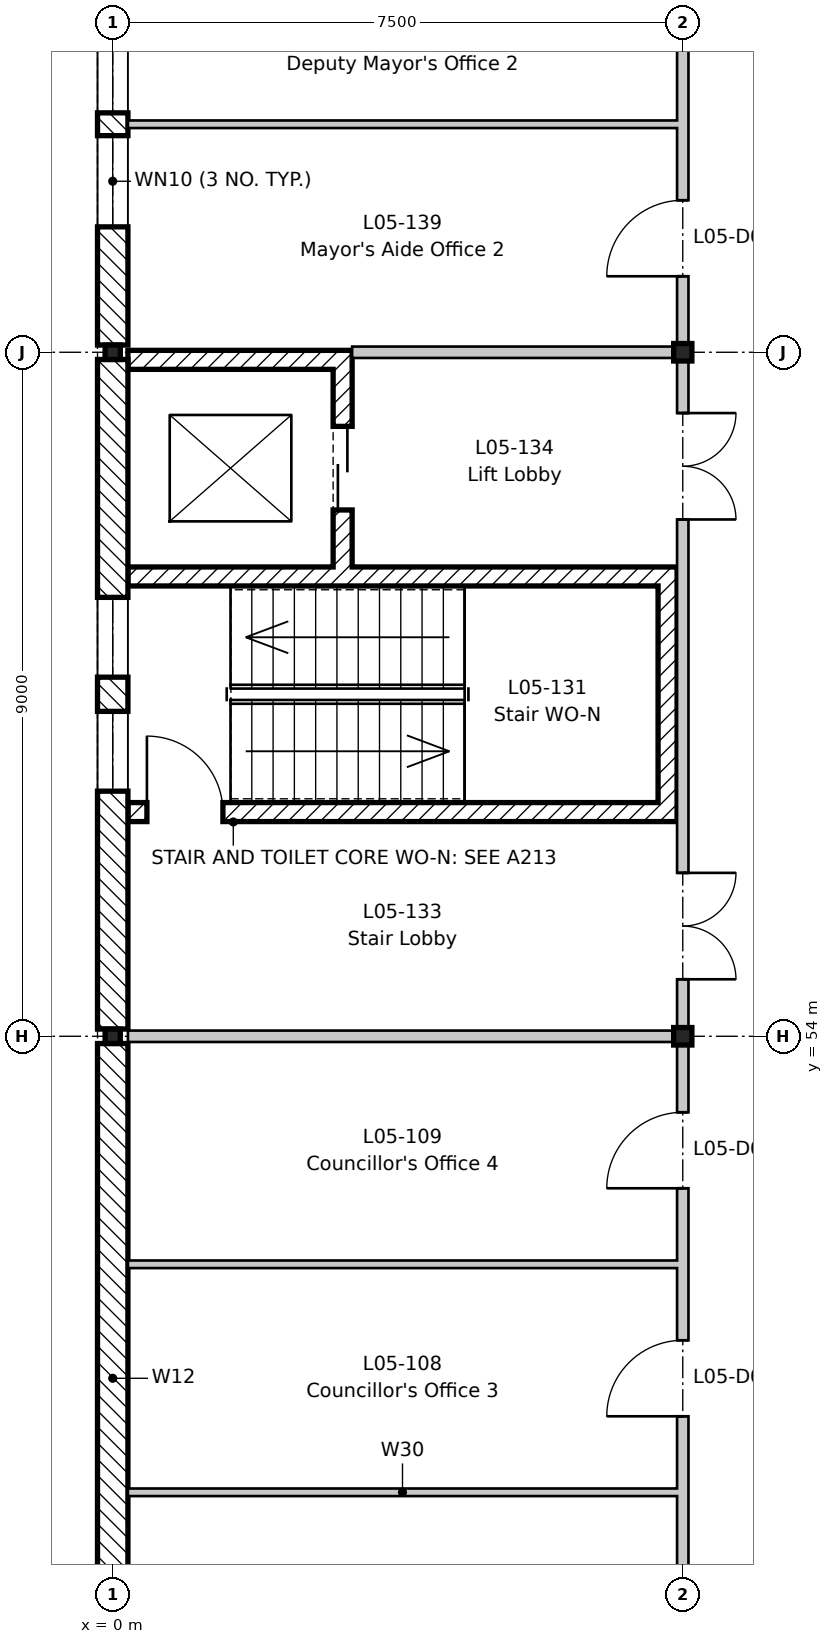
"""IFC4 building model, lengths in metres.
Left out: names, types, materials, properties, quantities, classifications, styles, units other than length and angle.
Written with IfcOpenShell. Run it as: python <this file> out.ifc"""

import sys

from ifc_helpers import new_model, si_unit, direction, frame, frame_2d, origin, origin_2d, place, context, subcontext, project, spatial, rectangle, i_section, extrude, element, fill, save


model = new_model("IFC4")
c1 = context("Model", 3, precision=1e-05, world=origin(), true_north=direction((0.0, 1.0)))
c2 = subcontext(c1, "Body", "Model", "MODEL_VIEW")
j1 = project(units=[si_unit("LENGTHUNIT", "METRE"), si_unit("PLANEANGLEUNIT", "RADIAN")], contexts=[c1])
p1 = place(None, origin())
s1 = spatial("IfcSite", under=j1, at=p1, CompositionType="ELEMENT")
p2 = place(p1, origin())
s2 = spatial("IfcBuilding", under=s1, at=p2, CompositionType="ELEMENT")
p3 = place(p2, frame((0.0, 0.0, 22.8)))
s3 = spatial("IfcBuildingStorey", under=s2, at=p3, CompositionType="ELEMENT", Elevation=22.8)
for number, where, z_axis, x_axis in (
    (1, (0.0, 54.0, -0.2), (0.0, 0.0, 1.0), (1.0, 0.0, 0.0)),
    (2, (0.0, 63.0, -0.2), (0.0, 0.0, 1.0), (1.0, 0.0, 0.0)),
):
    element("IfcColumn", number, at=place(p3, frame(where, z_axis=z_axis, x_axis=x_axis)), inside=s3, PredefinedType="COLUMN", context=c2, shape_type="SweptSolid", body=[
        extrude(i_section(OverallWidth=0.2, OverallDepth=0.19, WebThickness=0.007, FlangeThickness=0.01, FilletRadius=0.018, at=origin_2d()), origin(), (0.0, 0.0, 1.0), 4.15),
    ])
for number, where, z_axis, x_axis in (
    (3, (7.5, 54.0, -0.2), (0.0, 0.0, 1.0), (1.0, 0.0, 0.0)),
    (4, (7.5, 63.0, -0.2), (0.0, 0.0, 1.0), (1.0, 0.0, 0.0)),
):
    element("IfcColumn", number, at=place(p3, frame(where, z_axis=z_axis, x_axis=x_axis)), inside=s3, PredefinedType="COLUMN", context=c2, shape_type="SweptSolid", body=[
        extrude(i_section(OverallWidth=0.24, OverallDepth=0.23, WebThickness=0.008, FlangeThickness=0.012, FilletRadius=0.021, at=origin_2d()), origin(), (0.0, 0.0, 1.0), 4.15),
    ])
p4 = place(p3, frame((0.2, 56.95, 0.0), z_axis=(0.0, 0.0, 1.0), x_axis=(1.0, 0.0, 0.0)))
e5 = element("IfcWall", 5, at=p4, inside=s3, PredefinedType="SHEAR", context=c2, shape_type="SweptSolid", body=[
    extrude(rectangle(XDim=7.225, YDim=0.25, at=frame_2d((3.613, 0.0))), origin(), (0.0, 0.0, 1.0), 3.95),
])
p5 = place(p4, frame((0.25, 0.0, 0.0)))
e6 = element("IfcOpeningElement", 6, at=p5, cuts=e5, PredefinedType="OPENING", context=c2, shape_type="SweptSolid", body=[
    extrude(rectangle(XDim=1.0, YDim=2.1, at=frame_2d((0.5, 1.05))), frame((0.0, 0.135, 0.0), z_axis=(0.0, -1.0, 0.0), x_axis=(1.0, 0.0, 0.0)), (0.0, 0.0, 1.0), 0.27),
])
p6 = place(p3, frame((0.2, 60.05, 0.0), z_axis=(0.0, 0.0, 1.0), x_axis=(1.0, 0.0, 0.0)))
e7 = element("IfcWall", 7, at=p6, inside=s3, PredefinedType="SHEAR", context=c2, shape_type="SweptSolid", body=[
    extrude(rectangle(XDim=7.225, YDim=0.25, at=frame_2d((3.613, 0.0))), origin(), (0.0, 0.0, 1.0), 3.95),
])
p7 = place(p3, frame((7.3, 57.075, 0.0), z_axis=(0.0, 0.0, 1.0), x_axis=(0.0, 1.0, 0.0)))
e8 = element("IfcWall", 8, at=p7, inside=s3, PredefinedType="SHEAR", context=c2, shape_type="SweptSolid", body=[
    extrude(rectangle(XDim=2.85, YDim=0.25, at=frame_2d((1.425, 0.0))), origin(), (0.0, 0.0, 1.0), 3.95),
])
p8 = place(p3, frame((3.025, 60.175, 0.0), z_axis=(0.0, 0.0, 1.0), x_axis=(0.0, 1.0, 0.0)))
e9 = element("IfcWall", 9, at=p8, inside=s3, PredefinedType="SHEAR", context=c2, shape_type="SweptSolid", body=[
    extrude(rectangle(XDim=2.6, YDim=0.25, at=frame_2d((1.3, 0.0))), origin(), (0.0, 0.0, 1.0), 3.95),
])
p9 = place(p8, frame((0.75, 0.0, 0.0)))
e10 = element("IfcOpeningElement", 10, at=p9, cuts=e9, PredefinedType="OPENING", context=c2, shape_type="SweptSolid", body=[
    extrude(rectangle(XDim=1.1, YDim=2.1, at=frame_2d((0.55, 1.05))), frame((0.0, 0.135, 0.0), z_axis=(0.0, -1.0, 0.0), x_axis=(1.0, 0.0, 0.0)), (0.0, 0.0, 1.0), 0.27),
])
p10 = place(p3, frame((0.2, 62.9, 0.0), z_axis=(0.0, 0.0, 1.0), x_axis=(1.0, 0.0, 0.0)))
e11 = element("IfcWall", 11, at=p10, inside=s3, PredefinedType="SHEAR", context=c2, shape_type="SweptSolid", body=[
    extrude(rectangle(XDim=2.95, YDim=0.25, at=frame_2d((1.475, 0.0))), origin(), (0.0, 0.0, 1.0), 3.95),
])
p11 = place(p3, frame((0.0, 45.095, 0.0), z_axis=(0.0, 0.0, 1.0), x_axis=(0.0, 1.0, 0.0)))
e12 = element("IfcWall", 12, at=p11, inside=s3, PredefinedType="STANDARD", context=c2, shape_type="SweptSolid", body=[
    extrude(rectangle(XDim=8.81, YDim=0.4, at=frame_2d((4.405, 0.0))), origin(), (0.0, 0.0, 1.0), 3.55),
])
p12 = place(p3, frame((0.0, 54.095, 0.0), z_axis=(0.0, 0.0, 1.0), x_axis=(0.0, 1.0, 0.0)))
e13 = element("IfcWall", 13, at=p12, inside=s3, PredefinedType="STANDARD", context=c2, shape_type="SweptSolid", body=[
    extrude(rectangle(XDim=8.81, YDim=0.4, at=frame_2d((4.405, 0.0))), origin(), (0.0, 0.0, 1.0), 3.55),
])
p13 = place(p12, frame((3.13, 0.0, 0.9)))
e14 = element("IfcOpeningElement", 14, at=p13, cuts=e13, PredefinedType="OPENING", context=c2, shape_type="SweptSolid", body=[
    extrude(rectangle(XDim=1.05, YDim=2.6, at=frame_2d((0.525, 1.3))), frame((0.0, 0.21, 0.0), z_axis=(0.0, -1.0, 0.0), x_axis=(1.0, 0.0, 0.0)), (0.0, 0.0, 1.0), 0.42),
])
p14 = place(p12, frame((4.63, 0.0, 0.9)))
e15 = element("IfcOpeningElement", 15, at=p14, cuts=e13, PredefinedType="OPENING", context=c2, shape_type="SweptSolid", body=[
    extrude(rectangle(XDim=1.05, YDim=2.6, at=frame_2d((0.525, 1.3))), frame((0.0, 0.21, 0.0), z_axis=(0.0, -1.0, 0.0), x_axis=(1.0, 0.0, 0.0)), (0.0, 0.0, 1.0), 0.42),
])
p15 = place(p3, frame((0.0, 63.095, 0.0), z_axis=(0.0, 0.0, 1.0), x_axis=(0.0, 1.0, 0.0)))
e16 = element("IfcWall", 16, at=p15, inside=s3, PredefinedType="STANDARD", context=c2, shape_type="SweptSolid", body=[
    extrude(rectangle(XDim=7.31, YDim=0.4, at=frame_2d((3.655, 0.0))), origin(), (0.0, 0.0, 1.0), 3.55),
])
p16 = place(p15, frame((1.555, 0.0, 0.6)))
e17 = element("IfcOpeningElement", 17, at=p16, cuts=e16, PredefinedType="OPENING", context=c2, shape_type="SweptSolid", body=[
    extrude(rectangle(XDim=1.2, YDim=1.8, at=frame_2d((0.6, 0.9))), frame((0.0, 0.21, 0.0), z_axis=(0.0, -1.0, 0.0), x_axis=(1.0, 0.0, 0.0)), (0.0, 0.0, 1.0), 0.42),
])
p17 = place(p15, frame((3.055, 0.0, 0.6)))
e18 = element("IfcOpeningElement", 18, at=p17, cuts=e16, PredefinedType="OPENING", context=c2, shape_type="SweptSolid", body=[
    extrude(rectangle(XDim=1.2, YDim=1.8, at=frame_2d((0.6, 0.9))), frame((0.0, 0.21, 0.0), z_axis=(0.0, -1.0, 0.0), x_axis=(1.0, 0.0, 0.0)), (0.0, 0.0, 1.0), 0.42),
])
p18 = place(p15, frame((4.555, 0.0, 0.6)))
e19 = element("IfcOpeningElement", 19, at=p18, cuts=e16, PredefinedType="OPENING", context=c2, shape_type="SweptSolid", body=[
    extrude(rectangle(XDim=1.2, YDim=1.8, at=frame_2d((0.6, 0.9))), frame((0.0, 0.21, 0.0), z_axis=(0.0, -1.0, 0.0), x_axis=(1.0, 0.0, 0.0)), (0.0, 0.0, 1.0), 0.42),
])
for number, where, z_axis, x_axis in (
    (20, (0.2, 48.0, 0.0), (0.0, 0.0, 1.0), (1.0, 0.0, 0.0)),
    (21, (0.2, 51.0, 0.0), (0.0, 0.0, 1.0), (1.0, 0.0, 0.0)),
):
    element("IfcWall", number, at=place(p3, frame(where, z_axis=z_axis, x_axis=x_axis)), inside=s3, PredefinedType="PARTITIONING", context=c2, shape_type="SweptSolid", body=[
        extrude(rectangle(XDim=7.225, YDim=0.1, at=frame_2d((3.613, 0.0))), origin(), (0.0, 0.0, 1.0), 3.95),
    ])
p19 = place(p3, frame((0.2, 54.0, 0.0), z_axis=(0.0, 0.0, 1.0), x_axis=(1.0, 0.0, 0.0)))
e22 = element("IfcWall", 22, at=p19, inside=s3, PredefinedType="PARTITIONING", context=c2, shape_type="SweptSolid", body=[
    extrude(rectangle(XDim=7.225, YDim=0.15, at=frame_2d((3.613, 0.0))), origin(), (0.0, 0.0, 1.0), 3.6),
])
p20 = place(p3, frame((7.5, -8.8, 0.0), z_axis=(0.0, 0.0, 1.0), x_axis=(0.0, 1.0, 0.0)))
e23 = element("IfcWall", 23, at=p20, inside=s3, PredefinedType="PARTITIONING", context=c2, shape_type="SweptSolid", body=[
    extrude(rectangle(XDim=79.3, YDim=0.15, at=frame_2d((39.65, 0.0))), origin(), (0.0, 0.0, 1.0), 3.43),
])
p21 = place(p20, frame((18.8, 0.0, 0.0)))
e24 = element("IfcOpeningElement", 24, at=p21, cuts=e23, PredefinedType="OPENING", context=c2, shape_type="SweptSolid", body=[
    extrude(rectangle(XDim=1.0, YDim=2.1, at=frame_2d((0.5, 1.05))), frame((0.0, 0.085, 0.0), z_axis=(0.0, -1.0, 0.0), x_axis=(1.0, 0.0, 0.0)), (0.0, 0.0, 1.0), 0.17),
])
p22 = place(p20, frame((23.3, 0.0, 0.0)))
e25 = element("IfcOpeningElement", 25, at=p22, cuts=e23, PredefinedType="OPENING", context=c2, shape_type="SweptSolid", body=[
    extrude(rectangle(XDim=1.0, YDim=2.1, at=frame_2d((0.5, 1.05))), frame((0.0, 0.085, 0.0), z_axis=(0.0, -1.0, 0.0), x_axis=(1.0, 0.0, 0.0)), (0.0, 0.0, 1.0), 0.17),
])
p23 = place(p20, frame((27.8, 0.0, 0.0)))
e26 = element("IfcOpeningElement", 26, at=p23, cuts=e23, PredefinedType="OPENING", context=c2, shape_type="SweptSolid", body=[
    extrude(rectangle(XDim=1.0, YDim=2.1, at=frame_2d((0.5, 1.05))), frame((0.0, 0.085, 0.0), z_axis=(0.0, -1.0, 0.0), x_axis=(1.0, 0.0, 0.0)), (0.0, 0.0, 1.0), 0.17),
])
p24 = place(p20, frame((32.3, 0.0, 0.0)))
e27 = element("IfcOpeningElement", 27, at=p24, cuts=e23, PredefinedType="OPENING", context=c2, shape_type="SweptSolid", body=[
    extrude(rectangle(XDim=1.0, YDim=2.1, at=frame_2d((0.5, 1.05))), frame((0.0, 0.085, 0.0), z_axis=(0.0, -1.0, 0.0), x_axis=(1.0, 0.0, 0.0)), (0.0, 0.0, 1.0), 0.17),
])
p25 = place(p20, frame((45.8, 0.0, 0.0)))
e28 = element("IfcOpeningElement", 28, at=p25, cuts=e23, PredefinedType="OPENING", context=c2, shape_type="SweptSolid", body=[
    extrude(rectangle(XDim=1.0, YDim=2.1, at=frame_2d((0.5, 1.05))), frame((0.0, 0.085, 0.0), z_axis=(0.0, -1.0, 0.0), x_axis=(1.0, 0.0, 0.0)), (0.0, 0.0, 1.0), 0.17),
])
p26 = place(p20, frame((48.8, 0.0, 0.0)))
e29 = element("IfcOpeningElement", 29, at=p26, cuts=e23, PredefinedType="OPENING", context=c2, shape_type="SweptSolid", body=[
    extrude(rectangle(XDim=1.0, YDim=2.1, at=frame_2d((0.5, 1.05))), frame((0.0, 0.085, 0.0), z_axis=(0.0, -1.0, 0.0), x_axis=(1.0, 0.0, 0.0)), (0.0, 0.0, 1.0), 0.17),
])
p27 = place(p20, frame((54.55, 0.0, 0.0)))
e30 = element("IfcOpeningElement", 30, at=p27, cuts=e23, PredefinedType="OPENING", context=c2, shape_type="SweptSolid", body=[
    extrude(rectangle(XDim=1.0, YDim=2.1, at=frame_2d((0.5, 1.05))), frame((0.0, 0.085, 0.0), z_axis=(0.0, -1.0, 0.0), x_axis=(1.0, 0.0, 0.0)), (0.0, 0.0, 1.0), 0.17),
])
p28 = place(p20, frame((57.8, 0.0, 0.0)))
e31 = element("IfcOpeningElement", 31, at=p28, cuts=e23, PredefinedType="OPENING", context=c2, shape_type="SweptSolid", body=[
    extrude(rectangle(XDim=1.0, YDim=2.1, at=frame_2d((0.5, 1.05))), frame((0.0, 0.085, 0.0), z_axis=(0.0, -1.0, 0.0), x_axis=(1.0, 0.0, 0.0)), (0.0, 0.0, 1.0), 0.17),
])
p29 = place(p20, frame((60.8, 0.0, 0.0)))
e32 = element("IfcOpeningElement", 32, at=p29, cuts=e23, PredefinedType="OPENING", context=c2, shape_type="SweptSolid", body=[
    extrude(rectangle(XDim=1.0, YDim=2.1, at=frame_2d((0.5, 1.05))), frame((0.0, 0.085, 0.0), z_axis=(0.0, -1.0, 0.0), x_axis=(1.0, 0.0, 0.0)), (0.0, 0.0, 1.0), 0.17),
])
p30 = place(p20, frame((12.6, 0.0, 0.0)))
e33 = element("IfcOpeningElement", 33, at=p30, cuts=e23, PredefinedType="OPENING", context=c2, shape_type="SweptSolid", body=[
    extrude(rectangle(XDim=1.4, YDim=2.1, at=frame_2d((0.7, 1.05))), frame((0.0, 0.085, 0.0), z_axis=(0.0, -1.0, 0.0), x_axis=(1.0, 0.0, 0.0)), (0.0, 0.0, 1.0), 0.17),
])
p31 = place(p20, frame((3.6, 0.0, 0.0)))
e34 = element("IfcOpeningElement", 34, at=p31, cuts=e23, PredefinedType="OPENING", context=c2, shape_type="SweptSolid", body=[
    extrude(rectangle(XDim=1.4, YDim=2.1, at=frame_2d((0.7, 1.05))), frame((0.0, 0.085, 0.0), z_axis=(0.0, -1.0, 0.0), x_axis=(1.0, 0.0, 0.0)), (0.0, 0.0, 1.0), 0.17),
])
p32 = place(p20, frame((63.55, 0.0, 0.0)))
e35 = element("IfcOpeningElement", 35, at=p32, cuts=e23, PredefinedType="OPENING", context=c2, shape_type="SweptSolid", body=[
    extrude(rectangle(XDim=1.4, YDim=2.1, at=frame_2d((0.7, 1.05))), frame((0.0, 0.085, 0.0), z_axis=(0.0, -1.0, 0.0), x_axis=(1.0, 0.0, 0.0)), (0.0, 0.0, 1.0), 0.17),
])
p33 = place(p20, frame((69.6, 0.0, 0.0)))
e36 = element("IfcOpeningElement", 36, at=p33, cuts=e23, PredefinedType="OPENING", context=c2, shape_type="SweptSolid", body=[
    extrude(rectangle(XDim=1.4, YDim=2.1, at=frame_2d((0.7, 1.05))), frame((0.0, 0.085, 0.0), z_axis=(0.0, -1.0, 0.0), x_axis=(1.0, 0.0, 0.0)), (0.0, 0.0, 1.0), 0.17),
])
p34 = place(p20, frame((42.85, 0.0, 0.0)))
e37 = element("IfcOpeningElement", 37, at=p34, cuts=e23, PredefinedType="OPENING", context=c2, shape_type="SweptSolid", body=[
    extrude(rectangle(XDim=1.0, YDim=2.1, at=frame_2d((0.5, 1.05))), frame((0.0, 0.085, 0.0), z_axis=(0.0, -1.0, 0.0), x_axis=(1.0, 0.0, 0.0)), (0.0, 0.0, 1.0), 0.17),
])
p35 = place(p20, frame((36.55, 0.0, 0.0)))
e38 = element("IfcOpeningElement", 38, at=p35, cuts=e23, PredefinedType="OPENING", context=c2, shape_type="SweptSolid", body=[
    extrude(rectangle(XDim=1.4, YDim=2.1, at=frame_2d((0.7, 1.05))), frame((0.0, 0.085, 0.0), z_axis=(0.0, -1.0, 0.0), x_axis=(1.0, 0.0, 0.0)), (0.0, 0.0, 1.0), 0.17),
])
p36 = place(p20, frame((72.8, 0.0, 0.0)))
e39 = element("IfcOpeningElement", 39, at=p36, cuts=e23, PredefinedType="OPENING", context=c2, shape_type="SweptSolid", body=[
    extrude(rectangle(XDim=1.0, YDim=2.1, at=frame_2d((0.5, 1.05))), frame((0.0, 0.085, 0.0), z_axis=(0.0, -1.0, 0.0), x_axis=(1.0, 0.0, 0.0)), (0.0, 0.0, 1.0), 0.17),
])
p37 = place(p3, frame((3.15, 63.0, 0.0), z_axis=(0.0, 0.0, 1.0), x_axis=(1.0, 0.0, 0.0)))
e40 = element("IfcWall", 40, at=p37, inside=s3, PredefinedType="PARTITIONING", context=c2, shape_type="SweptSolid", body=[
    extrude(rectangle(XDim=4.275, YDim=0.15, at=frame_2d((2.138, 0.0))), origin(), (0.0, 0.0, 1.0), 3.6),
])
p38 = place(p3, frame((0.2, 66.0, 0.0), z_axis=(0.0, 0.0, 1.0), x_axis=(1.0, 0.0, 0.0)))
e41 = element("IfcWall", 41, at=p38, inside=s3, PredefinedType="PARTITIONING", context=c2, shape_type="SweptSolid", body=[
    extrude(rectangle(XDim=7.225, YDim=0.1, at=frame_2d((3.613, 0.0))), origin(), (0.0, 0.0, 1.0), 3.95),
])
p39 = place(p13, origin())
e42 = element("IfcWindow", 42, at=p39, inside=s3, PartitioningType="SINGLE_PANEL", PredefinedType="WINDOW", context=c2, shape_type="SweptSolid", body=[
    extrude(rectangle(XDim=1.05, YDim=2.6, at=frame_2d((0.525, 1.3))), frame((0.0, 0.03, 0.0), z_axis=(0.0, -1.0, 0.0), x_axis=(1.0, 0.0, 0.0)), (0.0, 0.0, 1.0), 0.06),
])
fill(e14, e42)
p40 = place(p14, origin())
e43 = element("IfcWindow", 43, at=p40, inside=s3, PartitioningType="SINGLE_PANEL", PredefinedType="WINDOW", context=c2, shape_type="SweptSolid", body=[
    extrude(rectangle(XDim=1.05, YDim=2.6, at=frame_2d((0.525, 1.3))), frame((0.0, 0.03, 0.0), z_axis=(0.0, -1.0, 0.0), x_axis=(1.0, 0.0, 0.0)), (0.0, 0.0, 1.0), 0.06),
])
fill(e15, e43)
p41 = place(p16, origin())
e44 = element("IfcWindow", 44, at=p41, inside=s3, PartitioningType="SINGLE_PANEL", PredefinedType="WINDOW", context=c2, shape_type="SweptSolid", body=[
    extrude(rectangle(XDim=1.2, YDim=1.8, at=frame_2d((0.6, 0.9))), frame((0.0, 0.03, 0.0), z_axis=(0.0, -1.0, 0.0), x_axis=(1.0, 0.0, 0.0)), (0.0, 0.0, 1.0), 0.06),
])
fill(e17, e44)
p42 = place(p17, origin())
e45 = element("IfcWindow", 45, at=p42, inside=s3, PartitioningType="SINGLE_PANEL", PredefinedType="WINDOW", context=c2, shape_type="SweptSolid", body=[
    extrude(rectangle(XDim=1.2, YDim=1.8, at=frame_2d((0.6, 0.9))), frame((0.0, 0.03, 0.0), z_axis=(0.0, -1.0, 0.0), x_axis=(1.0, 0.0, 0.0)), (0.0, 0.0, 1.0), 0.06),
])
fill(e18, e45)
p43 = place(p28, origin())
e46 = element("IfcDoor", 46, at=p43, inside=s3, OperationType="SINGLE_SWING_LEFT", PredefinedType="DOOR", context=c2, shape_type="SweptSolid", body=[
    extrude(rectangle(XDim=1.0, YDim=2.1, at=frame_2d((0.5, 1.05))), frame((0.0, 0.025, 0.0), z_axis=(0.0, -1.0, 0.0), x_axis=(1.0, 0.0, 0.0)), (0.0, 0.0, 1.0), 0.05),
])
fill(e31, e46)
p44 = place(p29, origin())
e47 = element("IfcDoor", 47, at=p44, inside=s3, OperationType="SINGLE_SWING_LEFT", PredefinedType="DOOR", context=c2, shape_type="SweptSolid", body=[
    extrude(rectangle(XDim=1.0, YDim=2.1, at=frame_2d((0.5, 1.05))), frame((0.0, 0.025, 0.0), z_axis=(0.0, -1.0, 0.0), x_axis=(1.0, 0.0, 0.0)), (0.0, 0.0, 1.0), 0.05),
])
fill(e32, e47)
p45 = place(p5, origin())
e48 = element("IfcDoor", 48, at=p45, inside=s3, OperationType="SINGLE_SWING_LEFT", PredefinedType="DOOR", context=c2, shape_type="SweptSolid", body=[
    extrude(rectangle(XDim=1.0, YDim=2.1, at=frame_2d((0.5, 1.05))), frame((0.0, 0.025, 0.0), z_axis=(0.0, -1.0, 0.0), x_axis=(1.0, 0.0, 0.0)), (0.0, 0.0, 1.0), 0.05),
])
fill(e6, e48)
p46 = place(p32, frame((1.4, 0.0, 0.0), z_axis=(0.0, 0.0, 1.0), x_axis=(-1.0, 0.0, 0.0)))
e49 = element("IfcDoor", 49, at=p46, inside=s3, OperationType="DOUBLE_DOOR_SINGLE_SWING", PredefinedType="DOOR", context=c2, shape_type="SweptSolid", body=[
    extrude(rectangle(XDim=1.4, YDim=2.1, at=frame_2d((0.7, 1.05))), frame((0.0, 0.025, 0.0), z_axis=(0.0, -1.0, 0.0), x_axis=(1.0, 0.0, 0.0)), (0.0, 0.0, 1.0), 0.05),
])
fill(e35, e49)
p47 = place(p33, frame((1.4, 0.0, 0.0), z_axis=(0.0, 0.0, 1.0), x_axis=(-1.0, 0.0, 0.0)))
e50 = element("IfcDoor", 50, at=p47, inside=s3, OperationType="DOUBLE_DOOR_SINGLE_SWING", PredefinedType="DOOR", context=c2, shape_type="SweptSolid", body=[
    extrude(rectangle(XDim=1.4, YDim=2.1, at=frame_2d((0.7, 1.05))), frame((0.0, 0.025, 0.0), z_axis=(0.0, -1.0, 0.0), x_axis=(1.0, 0.0, 0.0)), (0.0, 0.0, 1.0), 0.05),
])
fill(e36, e50)
p48 = place(p36, origin())
e51 = element("IfcDoor", 51, at=p48, inside=s3, OperationType="SINGLE_SWING_LEFT", PredefinedType="DOOR", context=c2, shape_type="SweptSolid", body=[
    extrude(rectangle(XDim=1.0, YDim=2.1, at=frame_2d((0.5, 1.05))), frame((0.0, 0.025, 0.0), z_axis=(0.0, -1.0, 0.0), x_axis=(1.0, 0.0, 0.0)), (0.0, 0.0, 1.0), 0.05),
])
fill(e39, e51)
p49 = place(p9, origin())
e52 = element("IfcDoor", 52, at=p49, inside=s3, OperationType="SLIDING_TO_LEFT", PredefinedType="DOOR", context=c2, shape_type="SweptSolid", body=[
    extrude(rectangle(XDim=1.1, YDim=2.1, at=frame_2d((0.55, 1.05))), frame((0.0, 0.025, 0.0), z_axis=(0.0, -1.0, 0.0), x_axis=(1.0, 0.0, 0.0)), (0.0, 0.0, 1.0), 0.05),
])
fill(e10, e52)
save(model, sys.argv[1])
